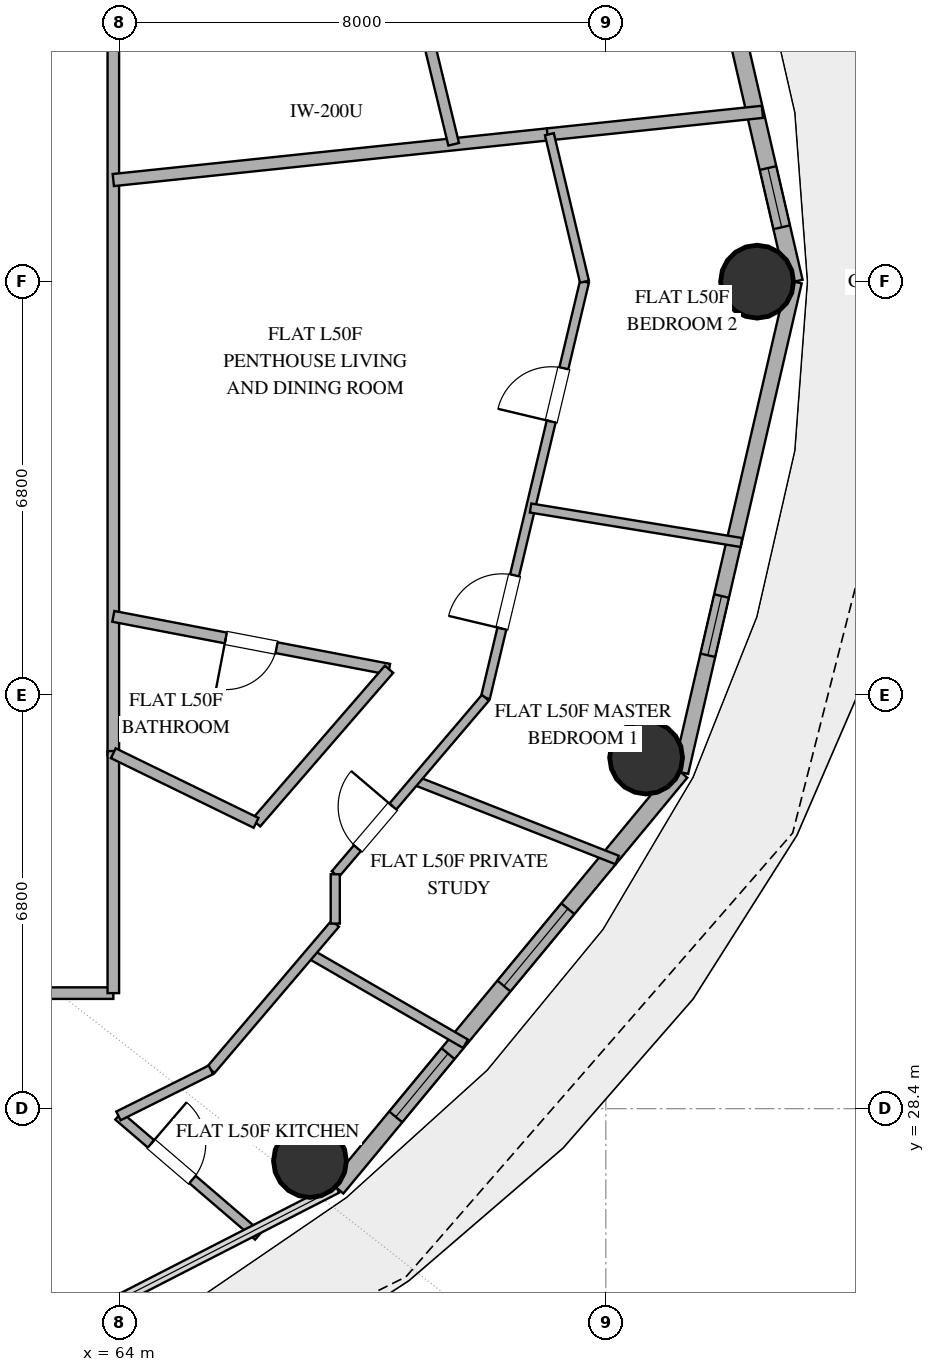
"""IFC4 building model, lengths in metres.
Left out: names, types, materials, properties, quantities, classifications, styles, units other than length and angle.
Written with IfcOpenShell. Run it as: python <this file> out.ifc"""

import sys

from ifc_helpers import new_model, si_unit, direction, frame, frame_2d, origin, origin_2d, place, context, subcontext, project, spatial, rectangle, hollow_circle, extrude, element, fill, save


model = new_model("IFC4")
c1 = context("Model", 3, precision=1e-05, world=origin(), true_north=direction((0.0, 1.0)))
c2 = subcontext(c1, "Body", "Model", "MODEL_VIEW")
j1 = project(units=[si_unit("LENGTHUNIT", "METRE"), si_unit("PLANEANGLEUNIT", "RADIAN")], contexts=[c1])
p1 = place(None, origin())
s1 = spatial("IfcSite", under=j1, at=p1, CompositionType="ELEMENT")
p2 = place(p1, origin())
s2 = spatial("IfcBuilding", under=s1, at=p2, CompositionType="ELEMENT")
p3 = place(p2, frame((0.0, 0.0, 197.4)))
s3 = spatial("IfcBuildingStorey", under=s2, at=p3, CompositionType="ELEMENT", Elevation=197.4)
for number, where, z_axis, x_axis in (
    (1, (74.487, 42.0, 0.0), (0.0, 0.0, 1.0), (1.0, 0.0, 0.0)),
    (2, (67.134, 27.54, 0.0), (0.0, 0.0, 1.0), (1.0, 0.0, 0.0)),
    (3, (72.662, 34.174, 0.0), (0.0, 0.0, 1.0), (1.0, 0.0, 0.0)),
):
    element("IfcColumn", number, at=place(p3, frame(where, z_axis=z_axis, x_axis=x_axis)), inside=s3, PredefinedType="COLUMN", context=c2, shape_type="SweptSolid", body=[
        extrude(hollow_circle(Radius=0.6, WallThickness=0.032, at=origin_2d()), origin(), (0.0, 0.0, 1.0), 3.25),
    ])
p4 = place(p3, frame((75.099, 42.0, 0.0), z_axis=(0.0, 0.0, 1.0), x_axis=(-0.225473184558, 0.974249374157, 0.0)))
e4 = element("IfcWall", 4, at=p4, inside=s3, PredefinedType="SOLIDWALL", context=c2, shape_type="SweptSolid", body=[
    extrude(rectangle(XDim=8.28, YDim=0.28, at=frame_2d((4.14, 0.0))), origin(), (0.0, 0.0, 1.0), 3.25),
])
p5 = place(p4, frame((5.644, 0.0, 0.0)))
e5 = element("IfcOpeningElement", 5, at=p5, cuts=e4, PredefinedType="OPENING", context=c2, shape_type="SweptSolid", body=[
    extrude(rectangle(XDim=1.1, YDim=2.25, at=frame_2d((0.55, 1.125))), frame((0.0, 0.15, 0.0), z_axis=(0.0, -1.0, 0.0), x_axis=(1.0, 0.0, 0.0)), (0.0, 0.0, 1.0), 0.3),
])
p6 = place(p4, frame((0.918, 0.0, 0.85)))
e6 = element("IfcOpeningElement", 6, at=p6, cuts=e4, PredefinedType="OPENING", context=c2, shape_type="SweptSolid", body=[
    extrude(rectangle(XDim=1.0, YDim=1.8, at=frame_2d((0.5, 0.9))), frame((0.0, 0.15, 0.0), z_axis=(0.0, -1.0, 0.0), x_axis=(1.0, 0.0, 0.0)), (0.0, 0.0, 1.0), 0.3),
])
p7 = place(p3, frame((67.576, 27.094, 0.0), z_axis=(0.0, 0.0, 1.0), x_axis=(0.637333477683, 0.770588111915, 0.0)))
e7 = element("IfcWall", 7, at=p7, inside=s3, PredefinedType="SOLIDWALL", context=c2, shape_type="SweptSolid", body=[
    extrude(rectangle(XDim=8.875, YDim=0.28, at=frame_2d((4.438, 0.0))), origin(), (0.0, 0.0, 1.0), 3.25),
])
p8 = place(p7, frame((1.52, 0.0, 0.85)))
e8 = element("IfcOpeningElement", 8, at=p8, cuts=e7, PredefinedType="OPENING", context=c2, shape_type="SweptSolid", body=[
    extrude(rectangle(XDim=1.35, YDim=1.8, at=frame_2d((0.675, 0.9))), frame((0.0, 0.15, 0.0), z_axis=(0.0, -1.0, 0.0), x_axis=(1.0, 0.0, 0.0)), (0.0, 0.0, 1.0), 0.3),
])
p9 = place(p7, frame((4.312, 0.0, 0.85)))
e9 = element("IfcOpeningElement", 9, at=p9, cuts=e7, PredefinedType="OPENING", context=c2, shape_type="SweptSolid", body=[
    extrude(rectangle(XDim=1.65, YDim=2.0, at=frame_2d((0.825, 1.0))), frame((0.0, 0.15, 0.0), z_axis=(0.0, -1.0, 0.0), x_axis=(1.0, 0.0, 0.0)), (0.0, 0.0, 1.0), 0.3),
])
p10 = place(p3, frame((73.232, 33.933, 0.0), z_axis=(0.0, 0.0, 1.0), x_axis=(0.225473184558, 0.974249374157, 0.0)))
e10 = element("IfcWall", 10, at=p10, inside=s3, PredefinedType="SOLIDWALL", context=c2, shape_type="SweptSolid", body=[
    extrude(rectangle(XDim=8.28, YDim=0.25, at=frame_2d((4.14, 0.0))), origin(), (0.0, 0.0, 1.0), 3.25),
])
p11 = place(p10, frame((1.974, 0.0, 1.42)))
e11 = element("IfcOpeningElement", 11, at=p11, cuts=e10, PredefinedType="OPENING", context=c2, shape_type="SweptSolid", body=[
    extrude(rectangle(XDim=1.0, YDim=1.05, at=frame_2d((0.5, 0.525))), frame((0.0, 0.135, 0.0), z_axis=(0.0, -1.0, 0.0), x_axis=(1.0, 0.0, 0.0)), (0.0, 0.0, 1.0), 0.27),
])
p12 = place(p3, frame((41.743, 30.3, 0.0), z_axis=(0.0, 0.0, 1.0), x_axis=(1.0, 0.0, 0.0)))
e12 = element("IfcWall", 12, at=p12, inside=s3, PredefinedType="PARTITIONING", context=c2, shape_type="SweptSolid", body=[
    extrude(rectangle(XDim=22.157, YDim=0.19, at=frame_2d((11.079, 0.0))), origin(), (0.0, 0.0, 1.0), 2.61),
])
p13 = place(p12, frame((7.451, 0.0, 0.0)))
e13 = element("IfcOpeningElement", 13, at=p13, cuts=e12, PredefinedType="OPENING", context=c2, shape_type="SweptSolid", body=[
    extrude(rectangle(XDim=1.0, YDim=2.2, at=frame_2d((0.5, 1.1))), frame((0.0, 0.105, 0.0), z_axis=(0.0, -1.0, 0.0), x_axis=(1.0, 0.0, 0.0)), (0.0, 0.0, 1.0), 0.21),
])
p14 = place(p12, frame((17.344, 0.0, 0.0)))
e14 = element("IfcOpeningElement", 14, at=p14, cuts=e12, PredefinedType="OPENING", context=c2, shape_type="SweptSolid", body=[
    extrude(rectangle(XDim=1.0, YDim=2.2, at=frame_2d((0.5, 1.1))), frame((0.0, 0.105, 0.0), z_axis=(0.0, -1.0, 0.0), x_axis=(1.0, 0.0, 0.0)), (0.0, 0.0, 1.0), 0.21),
])
p15 = place(p3, frame((63.9, 46.841, 0.0), z_axis=(0.0, 0.0, 1.0), x_axis=(0.0, -1.0, 0.0)))
e15 = element("IfcWall", 15, at=p15, inside=s3, PredefinedType="PARTITIONING", context=c2, shape_type="SweptSolid", body=[
    extrude(rectangle(XDim=12.632, YDim=0.19, at=frame_2d((6.316, 0.0))), origin(), (0.0, 0.0, 1.0), 2.61),
])
p16 = place(p3, frame((63.9, 43.671, 0.0), z_axis=(0.0, 0.0, 1.0), x_axis=(0.994523063153, 0.104517351942, 0.0)))
e16 = element("IfcWall", 16, at=p16, inside=s3, PredefinedType="PARTITIONING", context=c2, shape_type="SweptSolid", body=[
    extrude(rectangle(XDim=7.211, YDim=0.2, at=frame_2d((3.605, 0.0))), origin(), (0.0, 0.0, 1.0), 2.61),
])
p17 = place(p3, frame((68.435, 35.626, 0.0), z_axis=(0.0, 0.0, 1.0), x_axis=(-0.982105494501, 0.188331616227, 0.0)))
e17 = element("IfcWall", 17, at=p17, inside=s3, PredefinedType="PLUMBINGWALL", context=c2, shape_type="SweptSolid", body=[
    extrude(rectangle(XDim=4.617, YDim=0.18, at=frame_2d((2.309, 0.0))), origin(), (0.0, 0.0, 1.0), 2.61),
])
p18 = place(p17, frame((1.884, 0.0, 0.0)))
e18 = element("IfcOpeningElement", 18, at=p18, cuts=e17, PredefinedType="OPENING", context=c2, shape_type="SweptSolid", body=[
    extrude(rectangle(XDim=0.85, YDim=2.1, at=frame_2d((0.425, 1.05))), frame((0.0, 0.1, 0.0), z_axis=(0.0, -1.0, 0.0), x_axis=(1.0, 0.0, 0.0)), (0.0, 0.0, 1.0), 0.2),
])
p19 = place(p3, frame((69.498, 44.26, 0.0), z_axis=(0.0, 0.0, 1.0), x_axis=(-0.235510241151, 0.97187186723, 0.0)))
e19 = element("IfcWall", 19, at=p19, inside=s3, PredefinedType="PLUMBINGWALL", context=c2, shape_type="SweptSolid", body=[
    extrude(rectangle(XDim=4.125, YDim=0.18, at=frame_2d((2.062, 0.0))), origin(), (0.0, 0.0, 1.0), 2.61),
])
p20 = place(p3, frame((63.9, 34.281, 0.0), z_axis=(0.0, 0.0, 1.0), x_axis=(0.0, -1.0, 0.0)))
e20 = element("IfcWall", 20, at=p20, inside=s3, PredefinedType="PARTITIONING", context=c2, shape_type="SweptSolid", body=[
    extrude(rectangle(XDim=3.981, YDim=0.19, at=frame_2d((1.99, 0.0))), origin(), (0.0, 0.0, 1.0), 2.61),
])
p21 = place(p3, frame((70.019, 35.158, 0.0), z_axis=(0.0, 0.0, 1.0), x_axis=(0.231658068135, 0.972797275627, 0.0)))
e21 = element("IfcWall", 21, at=p21, inside=s3, PredefinedType="PARTITIONING", context=c2, shape_type="SweptSolid", body=[
    extrude(rectangle(XDim=7.034, YDim=0.15, at=frame_2d((3.517, 0.0))), origin(), (0.0, 0.0, 1.0), 2.61),
])
p22 = place(p21, frame((4.67, 0.0, 0.0)))
e22 = element("IfcOpeningElement", 22, at=p22, cuts=e21, PredefinedType="OPENING", context=c2, shape_type="SweptSolid", body=[
    extrude(rectangle(XDim=0.9, YDim=2.1, at=frame_2d((0.45, 1.05))), frame((0.0, 0.085, 0.0), z_axis=(0.0, -1.0, 0.0), x_axis=(1.0, 0.0, 0.0)), (0.0, 0.0, 1.0), 0.17),
])
p23 = place(p21, frame((1.17, 0.0, 0.0)))
e23 = element("IfcOpeningElement", 23, at=p23, cuts=e21, PredefinedType="OPENING", context=c2, shape_type="SweptSolid", body=[
    extrude(rectangle(XDim=0.9, YDim=2.1, at=frame_2d((0.45, 1.05))), frame((0.0, 0.085, 0.0), z_axis=(0.0, -1.0, 0.0), x_axis=(1.0, 0.0, 0.0)), (0.0, 0.0, 1.0), 0.17),
])
p24 = place(p3, frame((72.186, 32.49, 0.0), z_axis=(0.0, 0.0, 1.0), x_axis=(-0.930633495056, 0.365952589662, 0.0)))
e24 = element("IfcWall", 24, at=p24, inside=s3, PredefinedType="PARTITIONING", context=c2, shape_type="SweptSolid", body=[
    extrude(rectangle(XDim=3.573, YDim=0.15, at=frame_2d((1.786, 0.0))), origin(), (0.0, 0.0, 1.0), 2.61),
])
p25 = place(p3, frame((74.575, 44.793, 0.0), z_axis=(0.0, 0.0, 1.0), x_axis=(-0.994516359121, -0.104581123727, 0.0)))
e25 = element("IfcWall", 25, at=p25, inside=s3, PredefinedType="PARTITIONING", context=c2, shape_type="SweptSolid", body=[
    extrude(rectangle(XDim=3.555, YDim=0.2, at=frame_2d((1.778, 0.0))), origin(), (0.0, 0.0, 1.0), 2.61),
])
p26 = place(p3, frame((74.229, 37.711, 0.0), z_axis=(0.0, 0.0, 1.0), x_axis=(-0.98689451092, 0.161366738565, 0.0)))
e26 = element("IfcWall", 26, at=p26, inside=s3, PredefinedType="PARTITIONING", context=c2, shape_type="SweptSolid", body=[
    extrude(rectangle(XDim=3.513, YDim=0.15, at=frame_2d((1.757, 0.0))), origin(), (0.0, 0.0, 1.0), 2.61),
])
p27 = place(p3, frame((66.248, 33.1, 0.0), z_axis=(0.0, 0.0, 1.0), x_axis=(0.654579983518, 0.755992754712, 0.0)))
e27 = element("IfcWall", 27, at=p27, inside=s3, PredefinedType="PLUMBINGWALL", context=c2, shape_type="SweptSolid", body=[
    extrude(rectangle(XDim=3.342, YDim=0.18, at=frame_2d((1.671, 0.0))), origin(), (0.0, 0.0, 1.0), 2.61),
])
p28 = place(p3, frame((63.984, 28.281, 0.0), z_axis=(0.0, 0.0, 1.0), x_axis=(0.758829970644, -0.651288780537, 0.0)))
e28 = element("IfcWall", 28, at=p28, inside=s3, PredefinedType="PLUMBINGWALL", context=c2, shape_type="SweptSolid", body=[
    extrude(rectangle(XDim=3.031, YDim=0.16, at=frame_2d((1.515, 0.0))), origin(), (0.0, 0.0, 1.0), 2.61),
])
p29 = place(p28, frame((0.705, 0.0, 0.0)))
e29 = element("IfcOpeningElement", 29, at=p29, cuts=e28, PredefinedType="OPENING", context=c2, shape_type="SweptSolid", body=[
    extrude(rectangle(XDim=0.9, YDim=2.1, at=frame_2d((0.45, 1.05))), frame((0.0, 0.09, 0.0), z_axis=(0.0, -1.0, 0.0), x_axis=(1.0, 0.0, 0.0)), (0.0, 0.0, 1.0), 0.18),
])
p30 = place(p3, frame((69.693, 29.468, 0.0), z_axis=(0.0, 0.0, 1.0), x_axis=(-0.865888886841, 0.500236379769, 0.0)))
e30 = element("IfcWall", 30, at=p30, inside=s3, PredefinedType="PLUMBINGWALL", context=c2, shape_type="SweptSolid", body=[
    extrude(rectangle(XDim=2.96, YDim=0.16, at=frame_2d((1.48, 0.0))), origin(), (0.0, 0.0, 1.0), 2.61),
])
p31 = place(p3, frame((63.9, 34.245, 0.0), z_axis=(0.0, 0.0, 1.0), x_axis=(0.898795393126, -0.438368385374, 0.0)))
e31 = element("IfcWall", 31, at=p31, inside=s3, PredefinedType="PLUMBINGWALL", context=c2, shape_type="SweptSolid", body=[
    extrude(rectangle(XDim=2.612, YDim=0.18, at=frame_2d((1.306, 0.0))), origin(), (0.0, 0.0, 1.0), 2.61),
])
p32 = place(p3, frame((67.55, 31.443, 0.0), z_axis=(0.0, 0.0, 1.0), x_axis=(-0.647888606369, -0.761735094201, 0.0)))
e32 = element("IfcWall", 32, at=p32, inside=s3, PredefinedType="PLUMBINGWALL", context=c2, shape_type="SweptSolid", body=[
    extrude(rectangle(XDim=3.157, YDim=0.16, at=frame_2d((1.578, 0.0))), origin(), (0.0, 0.0, 1.0), 2.61),
])
p33 = place(p3, frame((71.649, 42.0, 0.0), z_axis=(0.0, 0.0, 1.0), x_axis=(-0.231642596653, 0.972800959814, 0.0)))
e33 = element("IfcWall", 33, at=p33, inside=s3, PredefinedType="PARTITIONING", context=c2, shape_type="SweptSolid", body=[
    extrude(rectangle(XDim=2.493, YDim=0.15, at=frame_2d((1.246, 0.0))), origin(), (0.0, 0.0, 1.0), 2.61),
])
p34 = place(p3, frame((67.55, 32.256, 0.0), z_axis=(0.0, 0.0, 1.0), x_axis=(0.648059335437, 0.761589848773, 0.0)))
e34 = element("IfcWall", 34, at=p34, inside=s3, PredefinedType="PARTITIONING", context=c2, shape_type="SweptSolid", body=[
    extrude(rectangle(XDim=3.811, YDim=0.15, at=frame_2d((1.905, 0.0))), origin(), (0.0, 0.0, 1.0), 2.61),
])
p35 = place(p34, frame((0.562, 0.0, 0.0)))
e35 = element("IfcOpeningElement", 35, at=p35, cuts=e34, PredefinedType="OPENING", context=c2, shape_type="SweptSolid", body=[
    extrude(rectangle(XDim=0.9, YDim=2.1, at=frame_2d((0.45, 1.05))), frame((0.0, 0.085, 0.0), z_axis=(0.0, -1.0, 0.0), x_axis=(1.0, 0.0, 0.0)), (0.0, 0.0, 1.0), 0.17),
])
p36 = place(p3, frame((65.505, 29.039, 0.0), z_axis=(0.0, 0.0, 1.0), x_axis=(-0.894972502213, -0.44612130669, 0.0)))
e36 = element("IfcWall", 36, at=p36, inside=s3, PredefinedType="PLUMBINGWALL", context=c2, shape_type="SweptSolid", body=[
    extrude(rectangle(XDim=1.699, YDim=0.16, at=frame_2d((0.85, 0.0))), origin(), (0.0, 0.0, 1.0), 2.61),
])
p37 = place(p3, frame((67.55, 31.443, 0.0), z_axis=(0.0, 0.0, 1.0), x_axis=(0.0, 1.0, 0.0)))
e37 = element("IfcWall", 37, at=p37, inside=s3, PredefinedType="PARTITIONING", context=c2, shape_type="SweptSolid", body=[
    extrude(rectangle(XDim=0.812, YDim=0.15, at=frame_2d((0.406, 0.0))), origin(), (0.0, 0.0, 1.0), 2.61),
])
p38 = place(p8, origin())
e38 = element("IfcWindow", 38, at=p38, inside=s3, PartitioningType="SINGLE_PANEL", PredefinedType="WINDOW", context=c2, shape_type="SweptSolid", body=[
    extrude(rectangle(XDim=1.35, YDim=1.8, at=frame_2d((0.675, 0.9))), frame((0.0, 0.03, 0.0), z_axis=(0.0, -1.0, 0.0), x_axis=(1.0, 0.0, 0.0)), (0.0, 0.0, 1.0), 0.06),
])
fill(e8, e38)
p39 = place(p9, origin())
e39 = element("IfcWindow", 39, at=p39, inside=s3, PartitioningType="SINGLE_PANEL", PredefinedType="WINDOW", context=c2, shape_type="SweptSolid", body=[
    extrude(rectangle(XDim=1.65, YDim=2.0, at=frame_2d((0.825, 1.0))), frame((0.0, 0.03, 0.0), z_axis=(0.0, -1.0, 0.0), x_axis=(1.0, 0.0, 0.0)), (0.0, 0.0, 1.0), 0.06),
])
fill(e9, e39)
p40 = place(p11, origin())
e40 = element("IfcWindow", 40, at=p40, inside=s3, PartitioningType="SINGLE_PANEL", PredefinedType="WINDOW", context=c2, shape_type="SweptSolid", body=[
    extrude(rectangle(XDim=1.0, YDim=1.05, at=frame_2d((0.5, 0.525))), frame((0.0, 0.03, 0.0), z_axis=(0.0, -1.0, 0.0), x_axis=(1.0, 0.0, 0.0)), (0.0, 0.0, 1.0), 0.06),
])
fill(e11, e40)
p41 = place(p6, origin())
e41 = element("IfcWindow", 41, at=p41, inside=s3, PartitioningType="SINGLE_PANEL", PredefinedType="WINDOW", context=c2, shape_type="SweptSolid", body=[
    extrude(rectangle(XDim=1.0, YDim=1.8, at=frame_2d((0.5, 0.9))), frame((0.0, 0.03, 0.0), z_axis=(0.0, -1.0, 0.0), x_axis=(1.0, 0.0, 0.0)), (0.0, 0.0, 1.0), 0.06),
])
fill(e6, e41)
p42 = place(p18, origin())
e42 = element("IfcDoor", 42, at=p42, inside=s3, OperationType="SINGLE_SWING_RIGHT", PredefinedType="DOOR", context=c2, shape_type="SweptSolid", body=[
    extrude(rectangle(XDim=0.85, YDim=2.1, at=frame_2d((0.425, 1.05))), frame((0.0, 0.025, 0.0), z_axis=(0.0, -1.0, 0.0), x_axis=(1.0, 0.0, 0.0)), (0.0, 0.0, 1.0), 0.05),
])
fill(e18, e42)
p43 = place(p22, origin())
e43 = element("IfcDoor", 43, at=p43, inside=s3, OperationType="SINGLE_SWING_LEFT", PredefinedType="DOOR", context=c2, shape_type="SweptSolid", body=[
    extrude(rectangle(XDim=0.9, YDim=2.1, at=frame_2d((0.45, 1.05))), frame((0.0, 0.025, 0.0), z_axis=(0.0, -1.0, 0.0), x_axis=(1.0, 0.0, 0.0)), (0.0, 0.0, 1.0), 0.05),
])
fill(e22, e43)
p44 = place(p23, origin())
e44 = element("IfcDoor", 44, at=p44, inside=s3, OperationType="SINGLE_SWING_LEFT", PredefinedType="DOOR", context=c2, shape_type="SweptSolid", body=[
    extrude(rectangle(XDim=0.9, YDim=2.1, at=frame_2d((0.45, 1.05))), frame((0.0, 0.025, 0.0), z_axis=(0.0, -1.0, 0.0), x_axis=(1.0, 0.0, 0.0)), (0.0, 0.0, 1.0), 0.05),
])
fill(e23, e44)
p45 = place(p29, origin())
e45 = element("IfcDoor", 45, at=p45, inside=s3, OperationType="SINGLE_SWING_LEFT", PredefinedType="DOOR", context=c2, shape_type="SweptSolid", body=[
    extrude(rectangle(XDim=0.9, YDim=2.1, at=frame_2d((0.45, 1.05))), frame((0.0, 0.025, 0.0), z_axis=(0.0, -1.0, 0.0), x_axis=(1.0, 0.0, 0.0)), (0.0, 0.0, 1.0), 0.05),
])
fill(e29, e45)
p46 = place(p35, origin())
e46 = element("IfcDoor", 46, at=p46, inside=s3, OperationType="SINGLE_SWING_RIGHT", PredefinedType="DOOR", context=c2, shape_type="SweptSolid", body=[
    extrude(rectangle(XDim=0.9, YDim=2.1, at=frame_2d((0.45, 1.05))), frame((0.0, 0.025, 0.0), z_axis=(0.0, -1.0, 0.0), x_axis=(1.0, 0.0, 0.0)), (0.0, 0.0, 1.0), 0.05),
])
fill(e35, e46)
save(model, sys.argv[1])
